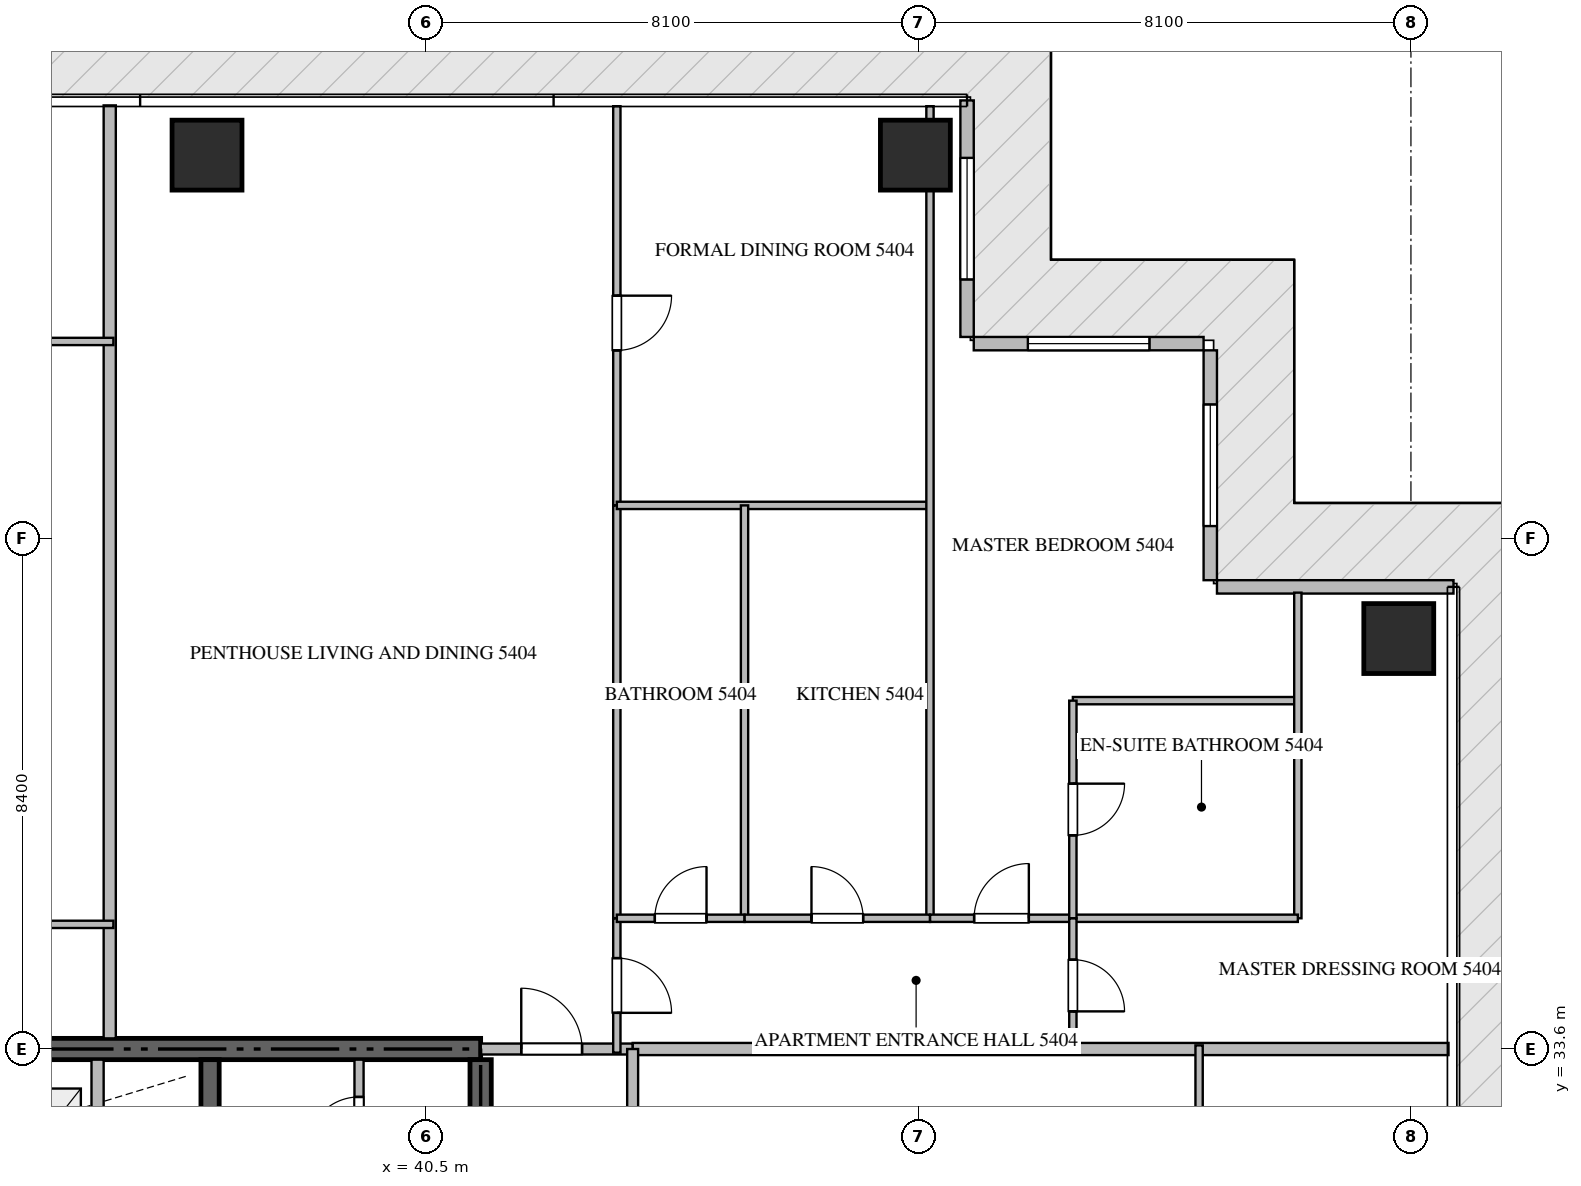
"""IFC4 building model, lengths in metres.
Left out: names, types, materials, properties, quantities, classifications, styles, units other than length and angle.
Written with IfcOpenShell. Run it as: python <this file> out.ifc"""

import sys

from ifc_helpers import new_model, si_unit, direction, frame, frame_2d, origin, origin_2d, place, context, subcontext, project, spatial, rectangle, extrude, source, transform, mapped, element, fill, save


model = new_model("IFC4")
c1 = context("Model", 3, precision=1e-05, world=origin(), true_north=direction((0.0, 1.0)))
c2 = subcontext(c1, "Body", "Model", "MODEL_VIEW")
j1 = project(units=[si_unit("LENGTHUNIT", "METRE"), si_unit("PLANEANGLEUNIT", "RADIAN")], contexts=[c1])
p1 = place(None, origin())
s1 = spatial("IfcSite", under=j1, at=p1, CompositionType="ELEMENT")
p2 = place(p1, origin())
s2 = spatial("IfcBuilding", under=s1, at=p2, CompositionType="ELEMENT")
p3 = place(p2, frame((0.0, 0.0, 218.15)))
s3 = spatial("IfcBuildingStorey", under=s2, at=p3, CompositionType="ELEMENT", Elevation=218.15)
p4 = place(p3, frame((41.4, 33.6, -0.26), z_axis=(0.0, 0.0, 1.0), x_axis=(-1.0, 0.0, 0.0)))
e1 = element("IfcWall", 1, at=p4, inside=s3, PredefinedType="SHEAR", context=c2, shape_type="SweptSolid", body=[
    extrude(rectangle(XDim=18.0, YDim=0.35, at=frame_2d((9.0, 0.0))), origin(), (0.0, 0.0, 1.0), 3.848),
])
p5 = place(p3, frame((41.4, 27.75, -0.26), z_axis=(0.0, 0.0, 1.0), x_axis=(0.0, 1.0, 0.0)))
e2 = element("IfcWall", 2, at=p5, inside=s3, PredefinedType="SHEAR", context=c2, shape_type="SweptSolid", body=[
    extrude(rectangle(XDim=5.675, YDim=0.35, at=frame_2d((2.837, 0.0))), origin(), (0.0, 0.0, 1.0), 3.848),
])
p6 = place(p3, frame((36.95, 27.05, -0.26), z_axis=(0.0, 0.0, 1.0), x_axis=(0.0, 1.0, 0.0)))
e3 = element("IfcWall", 3, at=p6, inside=s3, PredefinedType="SHEAR", context=c2, shape_type="SweptSolid", body=[
    extrude(rectangle(XDim=6.375, YDim=0.3, at=frame_2d((3.188, 0.0))), origin(), (0.0, 0.0, 1.0), 3.848),
])
m1 = source(origin(), c2, "Body", "SweptSolid", [
    extrude(rectangle(XDim=1.15, YDim=1.15, at=origin_2d()), origin(), (0.0, 0.0, 1.0), 3.85),
])
for number, where, z_axis, x_axis in (
    (4, (36.9, 48.3, -0.26), (0.0, 0.0, 1.0), (1.0, 0.0, 0.0)),
    (5, (48.55, 48.3, -0.26), (0.0, 0.0, 1.0), (1.0, 0.0, 0.0)),
    (6, (56.5, 40.35, -0.26), (0.0, 0.0, 1.0), (1.0, 0.0, 0.0)),
):
    element("IfcColumn", number, at=place(p3, frame(where, z_axis=z_axis, x_axis=x_axis)), inside=s3, PredefinedType="COLUMN", context=c2, shape_type="MappedRepresentation", body=[
        mapped(m1, transform((0.0, 0.0, 0.0), scale=1.0)),
    ])
p7 = place(p3, frame((57.4, 41.2, 0.0), z_axis=(0.0, 0.0, 1.0), x_axis=(-1.0, 0.0, 0.0)))
e7 = element("IfcWall", 7, at=p7, inside=s3, PredefinedType="ELEMENTEDWALL", context=c2, shape_type="SweptSolid", body=[
    extrude(rectangle(XDim=3.89, YDim=0.22, at=frame_2d((1.945, 0.0))), origin(), (0.0, 0.0, 1.0), 3.575),
])
p8 = place(p3, frame((53.4, 41.31, 0.0), z_axis=(0.0, 0.0, 1.0), x_axis=(0.0, 1.0, 0.0)))
e8 = element("IfcWall", 8, at=p8, inside=s3, PredefinedType="ELEMENTEDWALL", context=c2, shape_type="SweptSolid", body=[
    extrude(rectangle(XDim=3.78, YDim=0.22, at=frame_2d((1.89, 0.0))), origin(), (0.0, 0.0, 1.0), 3.575),
])
p9 = place(p8, frame((0.89, 0.0, 0.65)))
e9 = element("IfcOpeningElement", 9, at=p9, cuts=e8, PredefinedType="OPENING", context=c2, shape_type="SweptSolid", body=[
    extrude(rectangle(XDim=2.0, YDim=2.2, at=frame_2d((1.0, 1.1))), frame((0.0, 0.12, 0.0), z_axis=(0.0, -1.0, 0.0), x_axis=(1.0, 0.0, 0.0)), (0.0, 0.0, 1.0), 0.24),
])
p10 = place(p3, frame((53.29, 45.2, 0.0), z_axis=(0.0, 0.0, 1.0), x_axis=(-1.0, 0.0, 0.0)))
e10 = element("IfcWall", 10, at=p10, inside=s3, PredefinedType="ELEMENTEDWALL", context=c2, shape_type="SweptSolid", body=[
    extrude(rectangle(XDim=3.78, YDim=0.22, at=frame_2d((1.89, 0.0))), origin(), (0.0, 0.0, 1.0), 3.575),
])
p11 = place(p10, frame((0.89, 0.0, 0.65)))
e11 = element("IfcOpeningElement", 11, at=p11, cuts=e10, PredefinedType="OPENING", context=c2, shape_type="SweptSolid", body=[
    extrude(rectangle(XDim=2.0, YDim=2.2, at=frame_2d((1.0, 1.1))), frame((0.0, 0.12, 0.0), z_axis=(0.0, -1.0, 0.0), x_axis=(1.0, 0.0, 0.0)), (0.0, 0.0, 1.0), 0.24),
])
p12 = place(p3, frame((49.4, 45.31, 0.0), z_axis=(0.0, 0.0, 1.0), x_axis=(0.0, 1.0, 0.0)))
e12 = element("IfcWall", 12, at=p12, inside=s3, PredefinedType="ELEMENTEDWALL", context=c2, shape_type="SweptSolid", body=[
    extrude(rectangle(XDim=3.89, YDim=0.22, at=frame_2d((1.945, 0.0))), origin(), (0.0, 0.0, 1.0), 3.575),
])
p13 = place(p12, frame((0.945, 0.0, 0.65)))
e13 = element("IfcOpeningElement", 13, at=p13, cuts=e12, PredefinedType="OPENING", context=c2, shape_type="SweptSolid", body=[
    extrude(rectangle(XDim=2.0, YDim=2.2, at=frame_2d((1.0, 1.1))), frame((0.0, 0.12, 0.0), z_axis=(0.0, -1.0, 0.0), x_axis=(1.0, 0.0, 0.0)), (0.0, 0.0, 1.0), 0.24),
])
p14 = place(p3, frame((35.1, 30.75, 0.0), z_axis=(0.0, 0.0, 1.0), x_axis=(0.0, 1.0, 0.0)))
e14 = element("IfcWall", 14, at=p14, inside=s3, PredefinedType="STANDARD", context=c2, shape_type="SweptSolid", body=[
    extrude(rectangle(XDim=2.675, YDim=0.2, at=frame_2d((1.337, 0.0))), origin(), (0.0, 0.0, 1.0), 3.59),
])
p15 = place(p3, frame((39.4, 31.35, 0.0), z_axis=(0.0, 0.0, 1.0), x_axis=(0.0, 1.0, 0.0)))
e15 = element("IfcWall", 15, at=p15, inside=s3, PredefinedType="PARTITIONING", context=c2, shape_type="SweptSolid", body=[
    extrude(rectangle(XDim=2.075, YDim=0.15, at=frame_2d((1.038, 0.0))), origin(), (0.0, 0.0, 1.0), 3.59),
])
p16 = place(p15, frame((0.612, 0.0, 0.0)))
e16 = element("IfcOpeningElement", 16, at=p16, cuts=e15, PredefinedType="OPENING", context=c2, shape_type="SweptSolid", body=[
    extrude(rectangle(XDim=0.85, YDim=2.1, at=frame_2d((0.425, 1.05))), frame((0.0, 0.085, 0.0), z_axis=(0.0, -1.0, 0.0), x_axis=(1.0, 0.0, 0.0)), (0.0, 0.0, 1.0), 0.17),
])
p17 = place(p3, frame((35.3, 33.775, 0.0), z_axis=(0.0, 0.0, 1.0), x_axis=(0.0, 1.0, 0.0)))
e17 = element("IfcWall", 17, at=p17, inside=s3, PredefinedType="PARTITIONING", context=c2, shape_type="SweptSolid", body=[
    extrude(rectangle(XDim=15.343, YDim=0.2, at=frame_2d((7.671, 0.0))), origin(), (0.0, 0.0, 1.0), 3.59),
])
p18 = place(p3, frame((43.9, 33.6, 0.0), z_axis=(0.0, 0.0, 1.0), x_axis=(1.0, 0.0, 0.0)))
e18 = element("IfcWall", 18, at=p18, inside=s3, PredefinedType="PARTITIONING", context=c2, shape_type="SweptSolid", body=[
    extrude(rectangle(XDim=13.418, YDim=0.2, at=frame_2d((6.709, 0.0))), origin(), (0.0, 0.0, 1.0), 3.59),
])
p19 = place(p3, frame((41.402, 33.6, 0.0), z_axis=(0.0, 0.0, 1.0), x_axis=(1.0, 0.0, 0.0)))
e19 = element("IfcWall", 19, at=p19, inside=s3, PredefinedType="PARTITIONING", context=c2, shape_type="SweptSolid", body=[
    extrude(rectangle(XDim=2.496, YDim=0.18, at=frame_2d((1.248, 0.0))), origin(), (0.0, 0.0, 1.0), 3.59),
])
p20 = place(p19, frame((0.666, 0.0, 0.0)))
e20 = element("IfcOpeningElement", 20, at=p20, cuts=e19, PredefinedType="OPENING", context=c2, shape_type="SweptSolid", body=[
    extrude(rectangle(XDim=1.0, YDim=2.15, at=frame_2d((0.5, 1.075))), frame((0.0, 0.1, 0.0), z_axis=(0.0, -1.0, 0.0), x_axis=(1.0, 0.0, 0.0)), (0.0, 0.0, 1.0), 0.2),
])
p21 = place(p3, frame((43.9, 16.8, 0.0), z_axis=(0.0, 0.0, 1.0), x_axis=(0.0, 1.0, 0.0)))
e21 = element("IfcWall", 21, at=p21, inside=s3, PredefinedType="PARTITIONING", context=c2, shape_type="SweptSolid", body=[
    extrude(rectangle(XDim=16.8, YDim=0.18, at=frame_2d((8.4, 0.0))), origin(), (0.0, 0.0, 1.0), 3.59),
])
p22 = place(p21, frame((1.3, 0.0, 0.0)))
e22 = element("IfcOpeningElement", 22, at=p22, cuts=e21, PredefinedType="OPENING", context=c2, shape_type="SweptSolid", body=[
    extrude(rectangle(XDim=1.0, YDim=2.15, at=frame_2d((0.5, 1.075))), frame((0.0, 0.1, 0.0), z_axis=(0.0, -1.0, 0.0), x_axis=(1.0, 0.0, 0.0)), (0.0, 0.0, 1.0), 0.2),
])
for number, where, z_axis, x_axis in (
    (23, (26.3, 45.236, 0.0), (0.0, 0.0, 1.0), (1.0, 0.0, 0.0)),
    (24, (26.3, 35.65, 0.0), (0.0, 0.0, 1.0), (1.0, 0.0, 0.0)),
):
    element("IfcWall", number, at=place(p3, frame(where, z_axis=z_axis, x_axis=x_axis)), inside=s3, PredefinedType="PARTITIONING", context=c2, shape_type="SweptSolid", body=[
        extrude(rectangle(XDim=9.06, YDim=0.12, at=frame_2d((4.53, 0.0))), origin(), (0.0, 0.0, 1.0), 3.59),
    ])
p23 = place(p3, frame((43.64, 35.75, 0.0), z_axis=(0.0, 0.0, 1.0), x_axis=(0.0, -1.0, 0.0)))
e25 = element("IfcWall", 25, at=p23, inside=s3, PredefinedType="PARTITIONING", context=c2, shape_type="SweptSolid", body=[
    extrude(rectangle(XDim=2.21, YDim=0.12, at=frame_2d((1.105, 0.0))), origin(), (0.0, 0.0, 1.0), 3.59),
])
p24 = place(p23, frame((0.655, 0.0, 0.0)))
e26 = element("IfcOpeningElement", 26, at=p24, cuts=e25, PredefinedType="OPENING", context=c2, shape_type="SweptSolid", body=[
    extrude(rectangle(XDim=0.9, YDim=2.1, at=frame_2d((0.45, 1.05))), frame((0.0, 0.07, 0.0), z_axis=(0.0, -1.0, 0.0), x_axis=(1.0, 0.0, 0.0)), (0.0, 0.0, 1.0), 0.14),
])
p25 = place(p3, frame((43.64, 49.105, 0.0), z_axis=(0.0, 0.0, 1.0), x_axis=(0.0, -1.0, 0.0)))
e27 = element("IfcWall", 27, at=p25, inside=s3, PredefinedType="PARTITIONING", context=c2, shape_type="SweptSolid", body=[
    extrude(rectangle(XDim=6.565, YDim=0.12, at=frame_2d((3.282, 0.0))), origin(), (0.0, 0.0, 1.0), 3.59),
])
p26 = place(p25, frame((3.116, 0.0, 0.0)))
e28 = element("IfcOpeningElement", 28, at=p26, cuts=e27, PredefinedType="OPENING", context=c2, shape_type="SweptSolid", body=[
    extrude(rectangle(XDim=0.9, YDim=2.1, at=frame_2d((0.45, 1.05))), frame((0.0, 0.07, 0.0), z_axis=(0.0, -1.0, 0.0), x_axis=(1.0, 0.0, 0.0)), (0.0, 0.0, 1.0), 0.14),
])
p27 = place(p3, frame((43.64, 42.538, 0.0), z_axis=(0.0, 0.0, 1.0), x_axis=(0.0, -1.0, 0.0)))
e29 = element("IfcWall", 29, at=p27, inside=s3, PredefinedType="PARTITIONING", context=c2, shape_type="SweptSolid", body=[
    extrude(rectangle(XDim=6.786, YDim=0.12, at=frame_2d((3.393, 0.0))), origin(), (0.0, 0.0, 1.0), 3.59),
])
p28 = place(p3, frame((43.64, 42.54, 0.0), z_axis=(0.0, 0.0, 1.0), x_axis=(1.0, 0.0, 0.0)))
e30 = element("IfcWall", 30, at=p28, inside=s3, PredefinedType="PARTITIONING", context=c2, shape_type="SweptSolid", body=[
    extrude(rectangle(XDim=5.15, YDim=0.12, at=frame_2d((2.575, 0.0))), origin(), (0.0, 0.0, 1.0), 3.59),
])
p29 = place(p3, frame((48.79, 49.105, 0.0), z_axis=(0.0, 0.0, 1.0), x_axis=(0.0, -1.0, 0.0)))
e31 = element("IfcWall", 31, at=p29, inside=s3, PredefinedType="PARTITIONING", context=c2, shape_type="SweptSolid", body=[
    extrude(rectangle(XDim=13.355, YDim=0.12, at=frame_2d((6.677, 0.0))), origin(), (0.0, 0.0, 1.0), 3.122),
])
p30 = place(p3, frame((45.74, 42.54, 0.0), z_axis=(0.0, 0.0, 1.0), x_axis=(0.0, -1.0, 0.0)))
e32 = element("IfcWall", 32, at=p30, inside=s3, PredefinedType="PARTITIONING", context=c2, shape_type="SweptSolid", body=[
    extrude(rectangle(XDim=6.79, YDim=0.12, at=frame_2d((3.395, 0.0))), origin(), (0.0, 0.0, 1.0), 3.59),
])
p31 = place(p3, frame((43.64, 35.75, 0.0), z_axis=(0.0, 0.0, 1.0), x_axis=(1.0, 0.0, 0.0)))
e33 = element("IfcWall", 33, at=p31, inside=s3, PredefinedType="PARTITIONING", context=c2, shape_type="SweptSolid", body=[
    extrude(rectangle(XDim=2.1, YDim=0.12, at=frame_2d((1.05, 0.0))), origin(), (0.0, 0.0, 1.0), 3.59),
])
p32 = place(p31, frame((0.625, 0.0, 0.0)))
e34 = element("IfcOpeningElement", 34, at=p32, cuts=e33, PredefinedType="OPENING", context=c2, shape_type="SweptSolid", body=[
    extrude(rectangle(XDim=0.85, YDim=2.1, at=frame_2d((0.425, 1.05))), frame((0.0, 0.07, 0.0), z_axis=(0.0, -1.0, 0.0), x_axis=(1.0, 0.0, 0.0)), (0.0, 0.0, 1.0), 0.14),
])
p33 = place(p3, frame((45.742, 35.75, 0.0), z_axis=(0.0, 0.0, 1.0), x_axis=(1.0, 0.0, 0.0)))
e35 = element("IfcWall", 35, at=p33, inside=s3, PredefinedType="PARTITIONING", context=c2, shape_type="SweptSolid", body=[
    extrude(rectangle(XDim=3.048, YDim=0.12, at=frame_2d((1.524, 0.0))), origin(), (0.0, 0.0, 1.0), 3.59),
])
p34 = place(p33, frame((1.099, 0.0, 0.0)))
e36 = element("IfcOpeningElement", 36, at=p34, cuts=e35, PredefinedType="OPENING", context=c2, shape_type="SweptSolid", body=[
    extrude(rectangle(XDim=0.85, YDim=2.1, at=frame_2d((0.425, 1.05))), frame((0.0, 0.07, 0.0), z_axis=(0.0, -1.0, 0.0), x_axis=(1.0, 0.0, 0.0)), (0.0, 0.0, 1.0), 0.14),
])
p35 = place(p3, frame((48.792, 35.75, 0.0), z_axis=(0.0, 0.0, 1.0), x_axis=(1.0, 0.0, 0.0)))
e37 = element("IfcWall", 37, at=p35, inside=s3, PredefinedType="PARTITIONING", context=c2, shape_type="SweptSolid", body=[
    extrude(rectangle(XDim=2.348, YDim=0.12, at=frame_2d((1.174, 0.0))), origin(), (0.0, 0.0, 1.0), 3.59),
])
p36 = place(p35, frame((0.724, 0.0, 0.0)))
e38 = element("IfcOpeningElement", 38, at=p36, cuts=e37, PredefinedType="OPENING", context=c2, shape_type="SweptSolid", body=[
    extrude(rectangle(XDim=0.9, YDim=2.1, at=frame_2d((0.45, 1.05))), frame((0.0, 0.07, 0.0), z_axis=(0.0, -1.0, 0.0), x_axis=(1.0, 0.0, 0.0)), (0.0, 0.0, 1.0), 0.14),
])
p37 = place(p3, frame((51.14, 39.329, 0.0), z_axis=(0.0, 0.0, 1.0), x_axis=(1.0, 0.0, 0.0)))
e39 = element("IfcWall", 39, at=p37, inside=s3, PredefinedType="PARTITIONING", context=c2, shape_type="SweptSolid", body=[
    extrude(rectangle(XDim=3.7, YDim=0.12, at=frame_2d((1.85, 0.0))), origin(), (0.0, 0.0, 1.0), 3.59),
])
p38 = place(p3, frame((54.84, 41.105, 0.0), z_axis=(0.0, 0.0, 1.0), x_axis=(0.0, -1.0, 0.0)))
e40 = element("IfcWall", 40, at=p38, inside=s3, PredefinedType="PARTITIONING", context=c2, shape_type="SweptSolid", body=[
    extrude(rectangle(XDim=5.355, YDim=0.12, at=frame_2d((2.677, 0.0))), origin(), (0.0, 0.0, 1.0), 3.59),
])
p39 = place(p3, frame((51.142, 35.75, 0.0), z_axis=(0.0, 0.0, 1.0), x_axis=(1.0, 0.0, 0.0)))
e41 = element("IfcWall", 41, at=p39, inside=s3, PredefinedType="PARTITIONING", context=c2, shape_type="SweptSolid", body=[
    extrude(rectangle(XDim=3.698, YDim=0.12, at=frame_2d((1.849, 0.0))), origin(), (0.0, 0.0, 1.0), 3.59),
])
p40 = place(p3, frame((51.14, 39.329, 0.0), z_axis=(0.0, 0.0, 1.0), x_axis=(0.0, -1.0, 0.0)))
e42 = element("IfcWall", 42, at=p40, inside=s3, PredefinedType="PARTITIONING", context=c2, shape_type="SweptSolid", body=[
    extrude(rectangle(XDim=3.579, YDim=0.12, at=frame_2d((1.79, 0.0))), origin(), (0.0, 0.0, 1.0), 3.59),
])
p41 = place(p40, frame((1.365, 0.0, 0.0)))
e43 = element("IfcOpeningElement", 43, at=p41, cuts=e42, PredefinedType="OPENING", context=c2, shape_type="SweptSolid", body=[
    extrude(rectangle(XDim=0.85, YDim=2.1, at=frame_2d((0.425, 1.05))), frame((0.0, 0.07, 0.0), z_axis=(0.0, -1.0, 0.0), x_axis=(1.0, 0.0, 0.0)), (0.0, 0.0, 1.0), 0.14),
])
p42 = place(p3, frame((51.14, 35.748, 0.0), z_axis=(0.0, 0.0, 1.0), x_axis=(0.0, -1.0, 0.0)))
e44 = element("IfcWall", 44, at=p42, inside=s3, PredefinedType="PARTITIONING", context=c2, shape_type="SweptSolid", body=[
    extrude(rectangle(XDim=2.208, YDim=0.12, at=frame_2d((1.104, 0.0))), origin(), (0.0, 0.0, 1.0), 3.59),
])
p43 = place(p42, frame((0.679, 0.0, 0.0)))
e45 = element("IfcOpeningElement", 45, at=p43, cuts=e44, PredefinedType="OPENING", context=c2, shape_type="SweptSolid", body=[
    extrude(rectangle(XDim=0.85, YDim=2.1, at=frame_2d((0.425, 1.05))), frame((0.0, 0.07, 0.0), z_axis=(0.0, -1.0, 0.0), x_axis=(1.0, 0.0, 0.0)), (0.0, 0.0, 1.0), 0.14),
])
p44 = place(p3, frame((53.216, 23.18, 0.0), z_axis=(0.0, 0.0, 1.0), x_axis=(0.0, 1.0, 0.0)))
e46 = element("IfcWall", 46, at=p44, inside=s3, PredefinedType="PARTITIONING", context=c2, shape_type="SweptSolid", body=[
    extrude(rectangle(XDim=10.48, YDim=0.12, at=frame_2d((5.24, 0.0))), origin(), (0.0, 0.0, 1.0), 3.59),
])
m2 = source(origin(), c2, "Body", "SweptSolid", [
    extrude(rectangle(XDim=2.0, YDim=2.2, at=frame_2d((1.0, 1.1))), frame((0.0, 0.03, 0.0), z_axis=(0.0, -1.0, 0.0), x_axis=(1.0, 0.0, 0.0)), (0.0, 0.0, 1.0), 0.06),
])
p45 = place(p9, origin())
e47 = element("IfcWindow", 47, at=p45, inside=s3, PartitioningType="SINGLE_PANEL", PredefinedType="WINDOW", context=c2, shape_type="MappedRepresentation", body=[
    mapped(m2, transform((0.0, 0.0, 0.0), scale=1.0)),
])
fill(e9, e47)
p46 = place(p11, origin())
e48 = element("IfcWindow", 48, at=p46, inside=s3, PartitioningType="SINGLE_PANEL", PredefinedType="WINDOW", context=c2, shape_type="MappedRepresentation", body=[
    mapped(m2, transform((0.0, 0.0, 0.0), scale=1.0)),
])
fill(e11, e48)
p47 = place(p13, origin())
e49 = element("IfcWindow", 49, at=p47, inside=s3, PartitioningType="SINGLE_PANEL", PredefinedType="WINDOW", context=c2, shape_type="MappedRepresentation", body=[
    mapped(m2, transform((0.0, 0.0, 0.0), scale=1.0)),
])
fill(e13, e49)
m3 = source(origin(), c2, "Body", "SweptSolid", [
    extrude(rectangle(XDim=0.85, YDim=2.1, at=frame_2d((0.425, 1.05))), frame((0.0, 0.025, 0.0), z_axis=(0.0, -1.0, 0.0), x_axis=(1.0, 0.0, 0.0)), (0.0, 0.0, 1.0), 0.05),
])
p48 = place(p16, origin())
e50 = element("IfcDoor", 50, at=p48, inside=s3, OperationType="SINGLE_SWING_LEFT", PredefinedType="DOOR", context=c2, shape_type="MappedRepresentation", body=[
    mapped(m3, transform((0.0, 0.0, 0.0), scale=1.0)),
])
fill(e16, e50)
m4 = source(origin(), c2, "Body", "SweptSolid", [
    extrude(rectangle(XDim=1.0, YDim=2.15, at=frame_2d((0.5, 1.075))), frame((0.0, 0.025, 0.0), z_axis=(0.0, -1.0, 0.0), x_axis=(1.0, 0.0, 0.0)), (0.0, 0.0, 1.0), 0.05),
])
p49 = place(p20, origin())
e51 = element("IfcDoor", 51, at=p49, inside=s3, OperationType="SINGLE_SWING_LEFT", PredefinedType="DOOR", context=c2, shape_type="MappedRepresentation", body=[
    mapped(m4, transform((0.0, 0.0, 0.0), scale=1.0)),
])
fill(e20, e51)
m5 = source(origin(), c2, "Body", "SweptSolid", [
    extrude(rectangle(XDim=0.9, YDim=2.1, at=frame_2d((0.45, 1.05))), frame((0.0, 0.025, 0.0), z_axis=(0.0, -1.0, 0.0), x_axis=(1.0, 0.0, 0.0)), (0.0, 0.0, 1.0), 0.05),
])
p50 = place(p24, origin())
e52 = element("IfcDoor", 52, at=p50, inside=s3, OperationType="SINGLE_SWING_RIGHT", PredefinedType="DOOR", context=c2, shape_type="MappedRepresentation", body=[
    mapped(m5, transform((0.0, 0.0, 0.0), scale=1.0)),
])
fill(e26, e52)
p51 = place(p26, origin())
e53 = element("IfcDoor", 53, at=p51, inside=s3, OperationType="SINGLE_SWING_LEFT", PredefinedType="DOOR", context=c2, shape_type="MappedRepresentation", body=[
    mapped(m5, transform((0.0, 0.0, 0.0), scale=1.0)),
])
fill(e28, e53)
p52 = place(p32, origin())
e54 = element("IfcDoor", 54, at=p52, inside=s3, OperationType="SINGLE_SWING_RIGHT", PredefinedType="DOOR", context=c2, shape_type="MappedRepresentation", body=[
    mapped(m3, transform((0.0, 0.0, 0.0), scale=1.0)),
])
fill(e34, e54)
p53 = place(p34, origin())
e55 = element("IfcDoor", 55, at=p53, inside=s3, OperationType="SINGLE_SWING_LEFT", PredefinedType="DOOR", context=c2, shape_type="MappedRepresentation", body=[
    mapped(m3, transform((0.0, 0.0, 0.0), scale=1.0)),
])
fill(e36, e55)
p54 = place(p36, origin())
e56 = element("IfcDoor", 56, at=p54, inside=s3, OperationType="SINGLE_SWING_RIGHT", PredefinedType="DOOR", context=c2, shape_type="MappedRepresentation", body=[
    mapped(m5, transform((0.0, 0.0, 0.0), scale=1.0)),
])
fill(e38, e56)
p55 = place(p41, origin())
e57 = element("IfcDoor", 57, at=p55, inside=s3, OperationType="SINGLE_SWING_LEFT", PredefinedType="DOOR", context=c2, shape_type="MappedRepresentation", body=[
    mapped(m3, transform((0.0, 0.0, 0.0), scale=1.0)),
])
fill(e43, e57)
p56 = place(p43, origin())
e58 = element("IfcDoor", 58, at=p56, inside=s3, OperationType="SINGLE_SWING_RIGHT", PredefinedType="DOOR", context=c2, shape_type="MappedRepresentation", body=[
    mapped(m3, transform((0.0, 0.0, 0.0), scale=1.0)),
])
fill(e45, e58)
save(model, sys.argv[1])
